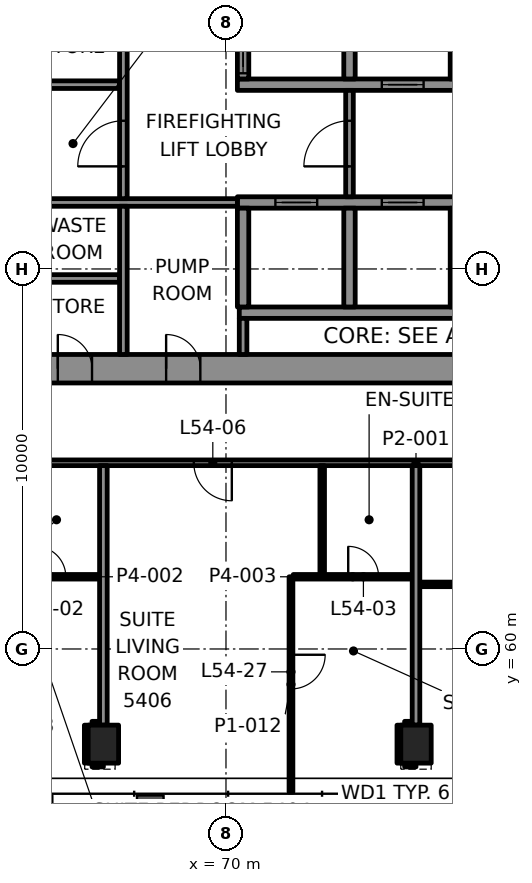
"""IFC4 building model, lengths in metres.
Left out: names, types, materials, properties, quantities, classifications, styles, units other than length and angle.
Written with IfcOpenShell. Run it as: python <this file> out.ifc"""

import sys

from ifc_helpers import new_model, si_unit, direction, frame, frame_2d, origin, origin_2d, place, context, subcontext, project, spatial, rectangle, hollow_rectangle, extrude, element, fill, save


model = new_model("IFC4")
c1 = context("Model", 3, precision=1e-05, world=origin(), true_north=direction((0.0, 1.0)))
c2 = subcontext(c1, "Body", "Model", "MODEL_VIEW")
j1 = project(units=[si_unit("LENGTHUNIT", "METRE"), si_unit("PLANEANGLEUNIT", "RADIAN")], contexts=[c1])
p1 = place(None, origin())
s1 = spatial("IfcSite", under=j1, at=p1, CompositionType="ELEMENT")
p2 = place(p1, origin())
s2 = spatial("IfcBuilding", under=s1, at=p2, CompositionType="ELEMENT")
p3 = place(p2, frame((0.0, 0.0, 229.9)))
s3 = spatial("IfcBuildingStorey", under=s2, at=p3, CompositionType="ELEMENT", Elevation=229.9)
for number, where, z_axis, x_axis in (
    (1, (66.774, 57.496, -0.0), (0.0, 0.0, 1.0), (1.0, 0.0, 0.0)),
    (2, (75.0, 57.496, -0.0), (0.0, 0.0, 1.0), (1.0, 0.0, 0.0)),
):
    element("IfcColumn", number, at=place(p3, frame(where, z_axis=z_axis, x_axis=x_axis)), inside=s3, PredefinedType="COLUMN", context=c2, shape_type="SweptSolid", body=[
        extrude(hollow_rectangle(XDim=0.8, YDim=1.0, WallThickness=0.05, at=origin_2d()), origin(), (0.0, 0.0, 1.0), 3.9),
    ])
p4 = place(p3, frame((64.0, 67.375, 0.0), z_axis=(0.0, 0.0, 1.0), x_axis=(1.0, 0.0, 0.0)))
e3 = element("IfcWall", 3, at=p4, inside=s3, PredefinedType="SHEAR", context=c2, shape_type="SweptSolid", body=[
    extrude(rectangle(XDim=22.0, YDim=0.75, at=frame_2d((11.0, 0.0))), origin(), (0.0, 0.0, 1.0), 3.7),
])
p5 = place(p4, frame((1.575, 0.0, 0.0)))
e4 = element("IfcOpeningElement", 4, at=p5, cuts=e3, PredefinedType="OPENING", context=c2, shape_type="SweptSolid", body=[
    extrude(rectangle(XDim=0.9, YDim=2.1, at=frame_2d((0.45, 1.05))), frame((0.0, 0.385, 0.0), z_axis=(0.0, -1.0, 0.0), x_axis=(1.0, 0.0, 0.0)), (0.0, 0.0, 1.0), 0.77),
])
p6 = place(p4, frame((4.425, 0.0, 0.0)))
e5 = element("IfcOpeningElement", 5, at=p6, cuts=e3, PredefinedType="OPENING", context=c2, shape_type="SweptSolid", body=[
    extrude(rectangle(XDim=0.9, YDim=2.1, at=frame_2d((0.45, 1.05))), frame((0.0, 0.385, 0.0), z_axis=(0.0, -1.0, 0.0), x_axis=(1.0, 0.0, 0.0)), (0.0, 0.0, 1.0), 0.77),
])
p7 = place(p3, frame((70.35, 68.85, 0.0), z_axis=(0.0, 0.0, 1.0), x_axis=(1.0, 0.0, 0.0)))
e6 = element("IfcWall", 6, at=p7, inside=s3, PredefinedType="SHEAR", context=c2, shape_type="SweptSolid", body=[
    extrude(rectangle(XDim=14.2, YDim=0.3, at=frame_2d((7.1, 0.0))), origin(), (0.0, 0.0, 1.0), 3.7),
])
p8 = place(p3, frame((70.3, 71.75, 0.0), z_axis=(0.0, 0.0, 1.0), x_axis=(1.0, 0.0, 0.0)))
e7 = element("IfcWall", 7, at=p8, inside=s3, PredefinedType="SHEAR", context=c2, shape_type="SweptSolid", body=[
    extrude(rectangle(XDim=14.3, YDim=0.3, at=frame_2d((7.15, 0.0))), origin(), (0.0, 0.0, 1.0), 3.7),
])
p9 = place(p8, frame((1.0, 0.0, 0.0)))
e8 = element("IfcOpeningElement", 8, at=p9, cuts=e7, PredefinedType="OPENING", context=c2, shape_type="SweptSolid", body=[
    extrude(rectangle(XDim=1.1, YDim=2.1, at=frame_2d((0.55, 1.05))), frame((0.0, 0.16, 0.0), z_axis=(0.0, -1.0, 0.0), x_axis=(1.0, 0.0, 0.0)), (0.0, 0.0, 1.0), 0.32),
])
p10 = place(p8, frame((3.8, 0.0, 0.0)))
e9 = element("IfcOpeningElement", 9, at=p10, cuts=e7, PredefinedType="OPENING", context=c2, shape_type="SweptSolid", body=[
    extrude(rectangle(XDim=1.1, YDim=2.1, at=frame_2d((0.55, 1.05))), frame((0.0, 0.16, 0.0), z_axis=(0.0, -1.0, 0.0), x_axis=(1.0, 0.0, 0.0)), (0.0, 0.0, 1.0), 0.32),
])
p11 = place(p8, frame((6.6, 0.0, 0.0)))
e10 = element("IfcOpeningElement", 10, at=p11, cuts=e7, PredefinedType="OPENING", context=c2, shape_type="SweptSolid", body=[
    extrude(rectangle(XDim=1.1, YDim=2.1, at=frame_2d((0.55, 1.05))), frame((0.0, 0.16, 0.0), z_axis=(0.0, -1.0, 0.0), x_axis=(1.0, 0.0, 0.0)), (0.0, 0.0, 1.0), 0.32),
])
p12 = place(p8, frame((9.4, 0.0, 0.0)))
e11 = element("IfcOpeningElement", 11, at=p12, cuts=e7, PredefinedType="OPENING", context=c2, shape_type="SweptSolid", body=[
    extrude(rectangle(XDim=1.1, YDim=2.1, at=frame_2d((0.55, 1.05))), frame((0.0, 0.16, 0.0), z_axis=(0.0, -1.0, 0.0), x_axis=(1.0, 0.0, 0.0)), (0.0, 0.0, 1.0), 0.32),
])
p13 = place(p8, frame((12.2, 0.0, 0.0)))
e12 = element("IfcOpeningElement", 12, at=p13, cuts=e7, PredefinedType="OPENING", context=c2, shape_type="SweptSolid", body=[
    extrude(rectangle(XDim=1.1, YDim=2.1, at=frame_2d((0.55, 1.05))), frame((0.0, 0.16, 0.0), z_axis=(0.0, -1.0, 0.0), x_axis=(1.0, 0.0, 0.0)), (0.0, 0.0, 1.0), 0.32),
])
p14 = place(p3, frame((70.3, 74.85, 0.0), z_axis=(0.0, 0.0, 1.0), x_axis=(1.0, 0.0, 0.0)))
e13 = element("IfcWall", 13, at=p14, inside=s3, PredefinedType="SHEAR", context=c2, shape_type="SweptSolid", body=[
    extrude(rectangle(XDim=14.3, YDim=0.3, at=frame_2d((7.15, 0.0))), origin(), (0.0, 0.0, 1.0), 3.7),
])
p15 = place(p14, frame((3.8, 0.0, 0.0)))
e14 = element("IfcOpeningElement", 14, at=p15, cuts=e13, PredefinedType="OPENING", context=c2, shape_type="SweptSolid", body=[
    extrude(rectangle(XDim=1.1, YDim=2.1, at=frame_2d((0.55, 1.05))), frame((0.0, 0.16, 0.0), z_axis=(0.0, -1.0, 0.0), x_axis=(1.0, 0.0, 0.0)), (0.0, 0.0, 1.0), 0.32),
])
p16 = place(p14, frame((12.2, 0.0, 0.0)))
e15 = element("IfcOpeningElement", 15, at=p16, cuts=e13, PredefinedType="OPENING", context=c2, shape_type="SweptSolid", body=[
    extrude(rectangle(XDim=1.1, YDim=2.1, at=frame_2d((0.55, 1.05))), frame((0.0, 0.16, 0.0), z_axis=(0.0, -1.0, 0.0), x_axis=(1.0, 0.0, 0.0)), (0.0, 0.0, 1.0), 0.32),
])
p17 = place(p3, frame((70.45, 69.0, 0.0), z_axis=(0.0, 0.0, 1.0), x_axis=(0.0, 1.0, 0.0)))
e16 = element("IfcWall", 16, at=p17, inside=s3, PredefinedType="SHEAR", context=c2, shape_type="SweptSolid", body=[
    extrude(rectangle(XDim=2.6, YDim=0.3, at=frame_2d((1.3, 0.0))), origin(), (0.0, 0.0, 1.0), 3.7),
])
p18 = place(p3, frame((70.45, 75.0, 0.0), z_axis=(0.0, 0.0, 1.0), x_axis=(0.0, 1.0, 0.0)))
e17 = element("IfcWall", 17, at=p18, inside=s3, PredefinedType="SHEAR", context=c2, shape_type="SweptSolid", body=[
    extrude(rectangle(XDim=2.6, YDim=0.3, at=frame_2d((1.3, 0.0))), origin(), (0.0, 0.0, 1.0), 3.7),
])
p19 = place(p18, frame((0.15, 0.0, 0.0)))
e18 = element("IfcOpeningElement", 18, at=p19, cuts=e17, PredefinedType="OPENING", context=c2, shape_type="SweptSolid", body=[
    extrude(rectangle(XDim=1.1, YDim=2.1, at=frame_2d((0.55, 1.05))), frame((0.0, 0.16, 0.0), z_axis=(0.0, -1.0, 0.0), x_axis=(1.0, 0.0, 0.0)), (0.0, 0.0, 1.0), 0.32),
])
for number, where, z_axis, x_axis in (
    (19, (73.25, 69.0, 0.0), (0.0, 0.0, 1.0), (0.0, 1.0, 0.0)),
    (20, (73.25, 75.0, 0.0), (0.0, 0.0, 1.0), (0.0, 1.0, 0.0)),
    (21, (76.05, 69.0, 0.0), (0.0, 0.0, 1.0), (0.0, 1.0, 0.0)),
    (22, (76.05, 75.0, 0.0), (0.0, 0.0, 1.0), (0.0, 1.0, 0.0)),
):
    element("IfcWall", number, at=place(p3, frame(where, z_axis=z_axis, x_axis=x_axis)), inside=s3, PredefinedType="SHEAR", context=c2, shape_type="SweptSolid", body=[
        extrude(rectangle(XDim=2.6, YDim=0.3, at=frame_2d((1.3, 0.0))), origin(), (0.0, 0.0, 1.0), 3.7),
    ])
for number, where, z_axis, x_axis in (
    (23, (66.475, 56.996, 0.0), (0.0, 0.0, 1.0), (1.0, 0.0, 0.0)),
    (24, (74.7, 56.996, 0.0), (0.0, 0.0, 1.0), (1.0, 0.0, 0.0)),
):
    element("IfcWall", number, at=place(p3, frame(where, z_axis=z_axis, x_axis=x_axis)), inside=s3, PredefinedType="PARTITIONING", context=c2, shape_type="SweptSolid", body=[
        extrude(rectangle(XDim=0.299, YDim=0.2, at=frame_2d((0.149, 0.0))), origin(), (0.0, 0.0, 1.0), 3.1),
    ])
p20 = place(p3, frame((66.475, 57.996, 0.0), z_axis=(0.0, 0.0, 1.0), x_axis=(1.0, 0.0, 0.0)))
e25 = element("IfcWall", 25, at=p20, inside=s3, PredefinedType="PARTITIONING", context=c2, shape_type="SweptSolid", body=[
    extrude(rectangle(XDim=0.199, YDim=0.2, at=frame_2d((0.1, 0.0))), origin(), (0.0, 0.0, 1.0), 3.1),
])
p21 = place(p3, frame((74.7, 57.996, 0.0), z_axis=(0.0, 0.0, 1.0), x_axis=(1.0, 0.0, 0.0)))
e26 = element("IfcWall", 26, at=p21, inside=s3, PredefinedType="PARTITIONING", context=c2, shape_type="SweptSolid", body=[
    extrude(rectangle(XDim=0.199, YDim=0.2, at=frame_2d((0.1, 0.0))), origin(), (0.0, 0.0, 1.0), 3.1),
])
p22 = place(p3, frame((75.1, 61.7, 0.0), z_axis=(0.0, 0.0, 1.0), x_axis=(1.0, 0.0, 0.0)))
e27 = element("IfcWall", 27, at=p22, inside=s3, PredefinedType="PARTITIONING", context=c2, shape_type="SweptSolid", body=[
    extrude(rectangle(XDim=3.601, YDim=0.12, at=frame_2d((1.801, 0.0))), origin(), (0.0, 0.0, 1.0), 3.1),
])
p23 = place(p22, frame((1.401, 0.0, 0.0)))
e28 = element("IfcOpeningElement", 28, at=p23, cuts=e27, PredefinedType="OPENING", context=c2, shape_type="SweptSolid", body=[
    extrude(rectangle(XDim=0.8, YDim=2.1, at=frame_2d((0.4, 1.05))), frame((0.0, 0.07, 0.0), z_axis=(0.0, -1.0, 0.0), x_axis=(1.0, 0.0, 0.0)), (0.0, 0.0, 1.0), 0.14),
])
p24 = place(p3, frame((63.534, 61.9, 0.0), z_axis=(0.0, 0.0, 1.0), x_axis=(1.0, 0.0, 0.0)))
e29 = element("IfcWall", 29, at=p24, inside=s3, PredefinedType="PARTITIONING", context=c2, shape_type="SweptSolid", body=[
    extrude(rectangle(XDim=3.13, YDim=0.12, at=frame_2d((1.565, 0.0))), origin(), (0.0, 0.0, 1.0), 3.1),
])
p25 = place(p24, frame((1.451, 0.0, 0.0)))
e30 = element("IfcOpeningElement", 30, at=p25, cuts=e29, PredefinedType="OPENING", context=c2, shape_type="SweptSolid", body=[
    extrude(rectangle(XDim=0.8, YDim=2.1, at=frame_2d((0.4, 1.05))), frame((0.0, 0.07, 0.0), z_axis=(0.0, -1.0, 0.0), x_axis=(1.0, 0.0, 0.0)), (0.0, 0.0, 1.0), 0.14),
])
p26 = place(p3, frame((71.77, 61.9, 0.0), z_axis=(0.0, 0.0, 1.0), x_axis=(1.0, 0.0, 0.0)))
e31 = element("IfcWall", 31, at=p26, inside=s3, PredefinedType="PARTITIONING", context=c2, shape_type="SweptSolid", body=[
    extrude(rectangle(XDim=3.13, YDim=0.12, at=frame_2d((1.565, 0.0))), origin(), (0.0, 0.0, 1.0), 3.1),
])
p27 = place(p26, frame((1.446, 0.0, 0.0)))
e32 = element("IfcOpeningElement", 32, at=p27, cuts=e31, PredefinedType="OPENING", context=c2, shape_type="SweptSolid", body=[
    extrude(rectangle(XDim=0.8, YDim=2.1, at=frame_2d((0.4, 1.05))), frame((0.0, 0.07, 0.0), z_axis=(0.0, -1.0, 0.0), x_axis=(1.0, 0.0, 0.0)), (0.0, 0.0, 1.0), 0.14),
])
p28 = place(p3, frame((88.099, 64.9, 0.0), z_axis=(0.0, 0.0, 1.0), x_axis=(-1.0, 0.0, 0.0)))
e33 = element("IfcWall", 33, at=p28, inside=s3, PredefinedType="PARTITIONING", context=c2, shape_type="SweptSolid", body=[
    extrude(rectangle(XDim=26.199, YDim=0.15, at=frame_2d((13.1, 0.0))), origin(), (0.0, 0.0, 1.0), 3.1),
])
p29 = place(p28, frame((2.088, 0.0, 0.0)))
e34 = element("IfcOpeningElement", 34, at=p29, cuts=e33, PredefinedType="OPENING", context=c2, shape_type="SweptSolid", body=[
    extrude(rectangle(XDim=0.9, YDim=2.1, at=frame_2d((0.45, 1.05))), frame((0.0, 0.085, 0.0), z_axis=(0.0, -1.0, 0.0), x_axis=(1.0, 0.0, 0.0)), (0.0, 0.0, 1.0), 0.17),
])
p30 = place(p28, frame((5.4, 0.0, 0.0)))
e35 = element("IfcOpeningElement", 35, at=p30, cuts=e33, PredefinedType="OPENING", context=c2, shape_type="SweptSolid", body=[
    extrude(rectangle(XDim=1.0, YDim=2.1, at=frame_2d((0.5, 1.05))), frame((0.0, 0.085, 0.0), z_axis=(0.0, -1.0, 0.0), x_axis=(1.0, 0.0, 0.0)), (0.0, 0.0, 1.0), 0.17),
])
p31 = place(p28, frame((17.946, 0.0, 0.0)))
e36 = element("IfcOpeningElement", 36, at=p31, cuts=e33, PredefinedType="OPENING", context=c2, shape_type="SweptSolid", body=[
    extrude(rectangle(XDim=1.0, YDim=2.1, at=frame_2d((0.5, 1.05))), frame((0.0, 0.085, 0.0), z_axis=(0.0, -1.0, 0.0), x_axis=(1.0, 0.0, 0.0)), (0.0, 0.0, 1.0), 0.17),
])
p32 = place(p28, frame((24.395, 0.0, 0.0)))
e37 = element("IfcOpeningElement", 37, at=p32, cuts=e33, PredefinedType="OPENING", context=c2, shape_type="SweptSolid", body=[
    extrude(rectangle(XDim=1.0, YDim=2.1, at=frame_2d((0.5, 1.05))), frame((0.0, 0.085, 0.0), z_axis=(0.0, -1.0, 0.0), x_axis=(1.0, 0.0, 0.0)), (0.0, 0.0, 1.0), 0.17),
])
p33 = place(p3, frame((75.0, 57.997, 0.0), z_axis=(0.0, 0.0, 1.0), x_axis=(0.0, 1.0, 0.0)))
e38 = element("IfcWall", 38, at=p33, inside=s3, PredefinedType="PARTITIONING", context=c2, shape_type="SweptSolid", body=[
    extrude(rectangle(XDim=6.828, YDim=0.2, at=frame_2d((3.414, 0.0))), origin(), (0.0, 0.0, 1.0), 3.1),
])
p34 = place(p3, frame((74.6, 56.997, 0.0), z_axis=(0.0, 0.0, 1.0), x_axis=(0.0, 1.0, 0.0)))
e39 = element("IfcWall", 39, at=p34, inside=s3, PredefinedType="PARTITIONING", context=c2, shape_type="SweptSolid", body=[
    extrude(rectangle(XDim=0.999, YDim=0.2, at=frame_2d((0.5, 0.0))), origin(), (0.0, 0.0, 1.0), 3.022),
])
p35 = place(p3, frame((72.532, 61.96, 0.0), z_axis=(0.0, 0.0, 1.0), x_axis=(0.0, 1.0, 0.0)))
e40 = element("IfcWall", 40, at=p35, inside=s3, PredefinedType="PARTITIONING", context=c2, shape_type="SweptSolid", body=[
    extrude(rectangle(XDim=2.865, YDim=0.12, at=frame_2d((1.433, 0.0))), origin(), (0.0, 0.0, 1.0), 3.1),
])
p36 = place(p3, frame((71.71, 61.9, 0.0), z_axis=(0.0, 0.0, 1.0), x_axis=(0.0, -1.0, 0.0)))
e41 = element("IfcWall", 41, at=p36, inside=s3, PredefinedType="PARTITIONING", context=c2, shape_type="SweptSolid", body=[
    extrude(rectangle(XDim=5.664, YDim=0.1, at=frame_2d((2.832, 0.0))), origin(), (0.0, 0.0, 1.0), 3.022),
])
p37 = place(p36, frame((2.052, 0.0, 0.0)))
e42 = element("IfcOpeningElement", 42, at=p37, cuts=e41, PredefinedType="OPENING", context=c2, shape_type="SweptSolid", body=[
    extrude(rectangle(XDim=0.9, YDim=2.1, at=frame_2d((0.45, 1.05))), frame((0.0, 0.06, 0.0), z_axis=(0.0, -1.0, 0.0), x_axis=(1.0, 0.0, 0.0)), (0.0, 0.0, 1.0), 0.12),
])
p38 = place(p3, frame((66.774, 57.997, 0.0), z_axis=(0.0, 0.0, 1.0), x_axis=(0.0, 1.0, 0.0)))
e43 = element("IfcWall", 43, at=p38, inside=s3, PredefinedType="PARTITIONING", context=c2, shape_type="SweptSolid", body=[
    extrude(rectangle(XDim=6.828, YDim=0.2, at=frame_2d((3.414, 0.0))), origin(), (0.0, 0.0, 1.0), 3.1),
])
p39 = place(p3, frame((66.374, 56.997, 0.0), z_axis=(0.0, 0.0, 1.0), x_axis=(0.0, 1.0, 0.0)))
e44 = element("IfcWall", 44, at=p39, inside=s3, PredefinedType="PARTITIONING", context=c2, shape_type="SweptSolid", body=[
    extrude(rectangle(XDim=0.999, YDim=0.2, at=frame_2d((0.5, 0.0))), origin(), (0.0, 0.0, 1.0), 3.022),
])
p40 = place(p3, frame((64.75, 69.75, 0.0), z_axis=(0.0, 0.0, 1.0), x_axis=(1.0, 0.0, 0.0)))
e45 = element("IfcWall", 45, at=p40, inside=s3, PredefinedType="PARTITIONING", context=c2, shape_type="SweptSolid", body=[
    extrude(rectangle(XDim=2.45, YDim=0.2, at=frame_2d((1.225, 0.0))), origin(), (0.0, 0.0, 1.0), 3.7),
])
p41 = place(p3, frame((64.75, 71.75, 0.0), z_axis=(0.0, 0.0, 1.0), x_axis=(1.0, 0.0, 0.0)))
e46 = element("IfcWall", 46, at=p41, inside=s3, PredefinedType="PARTITIONING", context=c2, shape_type="SweptSolid", body=[
    extrude(rectangle(XDim=5.55, YDim=0.2, at=frame_2d((2.775, 0.0))), origin(), (0.0, 0.0, 1.0), 3.7),
])
p42 = place(p3, frame((64.75, 74.85, 0.0), z_axis=(0.0, 0.0, 1.0), x_axis=(1.0, 0.0, 0.0)))
e47 = element("IfcWall", 47, at=p42, inside=s3, PredefinedType="PARTITIONING", context=c2, shape_type="SweptSolid", body=[
    extrude(rectangle(XDim=2.45, YDim=0.2, at=frame_2d((1.225, 0.0))), origin(), (0.0, 0.0, 1.0), 3.7),
])
p43 = place(p3, frame((67.3, 67.75, 0.0), z_axis=(0.0, 0.0, 1.0), x_axis=(0.0, 1.0, 0.0)))
e48 = element("IfcWall", 48, at=p43, inside=s3, PredefinedType="PARTITIONING", context=c2, shape_type="SweptSolid", body=[
    extrude(rectangle(XDim=3.9, YDim=0.2, at=frame_2d((1.95, 0.0))), origin(), (0.0, 0.0, 1.0), 3.7),
])
p44 = place(p3, frame((67.3, 71.85, 0.0), z_axis=(0.0, 0.0, 1.0), x_axis=(0.0, 1.0, 0.0)))
e49 = element("IfcWall", 49, at=p44, inside=s3, PredefinedType="PARTITIONING", context=c2, shape_type="SweptSolid", body=[
    extrude(rectangle(XDim=5.75, YDim=0.2, at=frame_2d((2.875, 0.0))), origin(), (0.0, 0.0, 1.0), 3.7),
])
p45 = place(p44, frame((0.85, 0.0, 0.0)))
e50 = element("IfcOpeningElement", 50, at=p45, cuts=e49, PredefinedType="OPENING", context=c2, shape_type="SweptSolid", body=[
    extrude(rectangle(XDim=1.2, YDim=2.1, at=frame_2d((0.6, 1.05))), frame((0.0, 0.11, 0.0), z_axis=(0.0, -1.0, 0.0), x_axis=(1.0, 0.0, 0.0)), (0.0, 0.0, 1.0), 0.22),
])
p46 = place(p3, frame((70.45, 67.75, 0.0), z_axis=(0.0, 0.0, 1.0), x_axis=(0.0, 1.0, 0.0)))
e51 = element("IfcWall", 51, at=p46, inside=s3, PredefinedType="PARTITIONING", context=c2, shape_type="SweptSolid", body=[
    extrude(rectangle(XDim=0.95, YDim=0.2, at=frame_2d((0.475, 0.0))), origin(), (0.0, 0.0, 1.0), 3.7),
])
p47 = place(p3, frame((73.25, 71.9, 0.0), z_axis=(0.0, 0.0, 1.0), x_axis=(0.0, 1.0, 0.0)))
e52 = element("IfcWall", 52, at=p47, inside=s3, PredefinedType="PARTITIONING", context=c2, shape_type="SweptSolid", body=[
    extrude(rectangle(XDim=2.8, YDim=0.2, at=frame_2d((1.4, 0.0))), origin(), (0.0, 0.0, 1.0), 3.7),
])
p48 = place(p47, frame((0.8, 0.0, 0.0)))
e53 = element("IfcOpeningElement", 53, at=p48, cuts=e52, PredefinedType="OPENING", context=c2, shape_type="SweptSolid", body=[
    extrude(rectangle(XDim=1.2, YDim=2.1, at=frame_2d((0.6, 1.05))), frame((0.0, 0.11, 0.0), z_axis=(0.0, -1.0, 0.0), x_axis=(1.0, 0.0, 0.0)), (0.0, 0.0, 1.0), 0.22),
])
p49 = place(p25, origin())
e54 = element("IfcDoor", 54, at=p49, inside=s3, OperationType="SINGLE_SWING_RIGHT", PredefinedType="DOOR", context=c2, shape_type="SweptSolid", body=[
    extrude(rectangle(XDim=0.8, YDim=2.1, at=frame_2d((0.4, 1.05))), frame((0.0, 0.025, 0.0), z_axis=(0.0, -1.0, 0.0), x_axis=(1.0, 0.0, 0.0)), (0.0, 0.0, 1.0), 0.05),
])
fill(e30, e54)
p50 = place(p27, origin())
e55 = element("IfcDoor", 55, at=p50, inside=s3, OperationType="SINGLE_SWING_LEFT", PredefinedType="DOOR", context=c2, shape_type="SweptSolid", body=[
    extrude(rectangle(XDim=0.8, YDim=2.1, at=frame_2d((0.4, 1.05))), frame((0.0, 0.025, 0.0), z_axis=(0.0, -1.0, 0.0), x_axis=(1.0, 0.0, 0.0)), (0.0, 0.0, 1.0), 0.05),
])
fill(e32, e55)
p51 = place(p31, origin())
e56 = element("IfcDoor", 56, at=p51, inside=s3, OperationType="SINGLE_SWING_RIGHT", PredefinedType="DOOR", context=c2, shape_type="SweptSolid", body=[
    extrude(rectangle(XDim=1.0, YDim=2.1, at=frame_2d((0.5, 1.05))), frame((0.0, 0.025, 0.0), z_axis=(0.0, -1.0, 0.0), x_axis=(1.0, 0.0, 0.0)), (0.0, 0.0, 1.0), 0.05),
])
fill(e36, e56)
p52 = place(p37, origin())
e57 = element("IfcDoor", 57, at=p52, inside=s3, OperationType="SINGLE_SWING_LEFT", PredefinedType="DOOR", context=c2, shape_type="SweptSolid", body=[
    extrude(rectangle(XDim=0.9, YDim=2.1, at=frame_2d((0.45, 1.05))), frame((0.0, 0.025, 0.0), z_axis=(0.0, -1.0, 0.0), x_axis=(1.0, 0.0, 0.0)), (0.0, 0.0, 1.0), 0.05),
])
fill(e42, e57)
p53 = place(p9, origin())
e58 = element("IfcDoor", 58, at=p53, inside=s3, OperationType="DOUBLE_DOOR_SLIDING", PredefinedType="DOOR", context=c2, shape_type="SweptSolid", body=[
    extrude(rectangle(XDim=1.1, YDim=2.1, at=frame_2d((0.55, 1.05))), frame((0.0, 0.025, 0.0), z_axis=(0.0, -1.0, 0.0), x_axis=(1.0, 0.0, 0.0)), (0.0, 0.0, 1.0), 0.05),
])
fill(e8, e58)
p54 = place(p10, origin())
e59 = element("IfcDoor", 59, at=p54, inside=s3, OperationType="DOUBLE_DOOR_SLIDING", PredefinedType="DOOR", context=c2, shape_type="SweptSolid", body=[
    extrude(rectangle(XDim=1.1, YDim=2.1, at=frame_2d((0.55, 1.05))), frame((0.0, 0.025, 0.0), z_axis=(0.0, -1.0, 0.0), x_axis=(1.0, 0.0, 0.0)), (0.0, 0.0, 1.0), 0.05),
])
fill(e9, e59)
p55 = place(p19, origin())
e60 = element("IfcDoor", 60, at=p55, inside=s3, OperationType="DOUBLE_DOOR_SLIDING", PredefinedType="DOOR", context=c2, shape_type="SweptSolid", body=[
    extrude(rectangle(XDim=1.1, YDim=2.1, at=frame_2d((0.55, 1.05))), frame((0.0, 0.025, 0.0), z_axis=(0.0, -1.0, 0.0), x_axis=(1.0, 0.0, 0.0)), (0.0, 0.0, 1.0), 0.05),
])
fill(e18, e60)
p56 = place(p15, origin())
e61 = element("IfcDoor", 61, at=p56, inside=s3, OperationType="DOUBLE_DOOR_SLIDING", PredefinedType="DOOR", context=c2, shape_type="SweptSolid", body=[
    extrude(rectangle(XDim=1.1, YDim=2.1, at=frame_2d((0.55, 1.05))), frame((0.0, 0.025, 0.0), z_axis=(0.0, -1.0, 0.0), x_axis=(1.0, 0.0, 0.0)), (0.0, 0.0, 1.0), 0.05),
])
fill(e14, e61)
p57 = place(p48, origin())
e62 = element("IfcDoor", 62, at=p57, inside=s3, OperationType="SINGLE_SWING_LEFT", PredefinedType="DOOR", context=c2, shape_type="SweptSolid", body=[
    extrude(rectangle(XDim=1.2, YDim=2.1, at=frame_2d((0.6, 1.05))), frame((0.0, 0.025, 0.0), z_axis=(0.0, -1.0, 0.0), x_axis=(1.0, 0.0, 0.0)), (0.0, 0.0, 1.0), 0.05),
])
fill(e53, e62)
p58 = place(p45, origin())
e63 = element("IfcDoor", 63, at=p58, inside=s3, OperationType="SINGLE_SWING_RIGHT", PredefinedType="DOOR", context=c2, shape_type="SweptSolid", body=[
    extrude(rectangle(XDim=1.2, YDim=2.1, at=frame_2d((0.6, 1.05))), frame((0.0, 0.025, 0.0), z_axis=(0.0, -1.0, 0.0), x_axis=(1.0, 0.0, 0.0)), (0.0, 0.0, 1.0), 0.05),
])
fill(e50, e63)
p59 = place(p5, origin())
e64 = element("IfcDoor", 64, at=p59, inside=s3, OperationType="SINGLE_SWING_LEFT", PredefinedType="DOOR", context=c2, shape_type="SweptSolid", body=[
    extrude(rectangle(XDim=0.9, YDim=2.1, at=frame_2d((0.45, 1.05))), frame((0.0, 0.095, 0.0), z_axis=(0.0, -1.0, 0.0), x_axis=(1.0, 0.0, 0.0)), (0.0, 0.0, 1.0), 0.19),
])
fill(e4, e64)
p60 = place(p6, origin())
e65 = element("IfcDoor", 65, at=p60, inside=s3, OperationType="SINGLE_SWING_LEFT", PredefinedType="DOOR", context=c2, shape_type="SweptSolid", body=[
    extrude(rectangle(XDim=0.9, YDim=2.1, at=frame_2d((0.45, 1.05))), frame((0.0, 0.095, 0.0), z_axis=(0.0, -1.0, 0.0), x_axis=(1.0, 0.0, 0.0)), (0.0, 0.0, 1.0), 0.19),
])
fill(e5, e65)
save(model, sys.argv[1])
